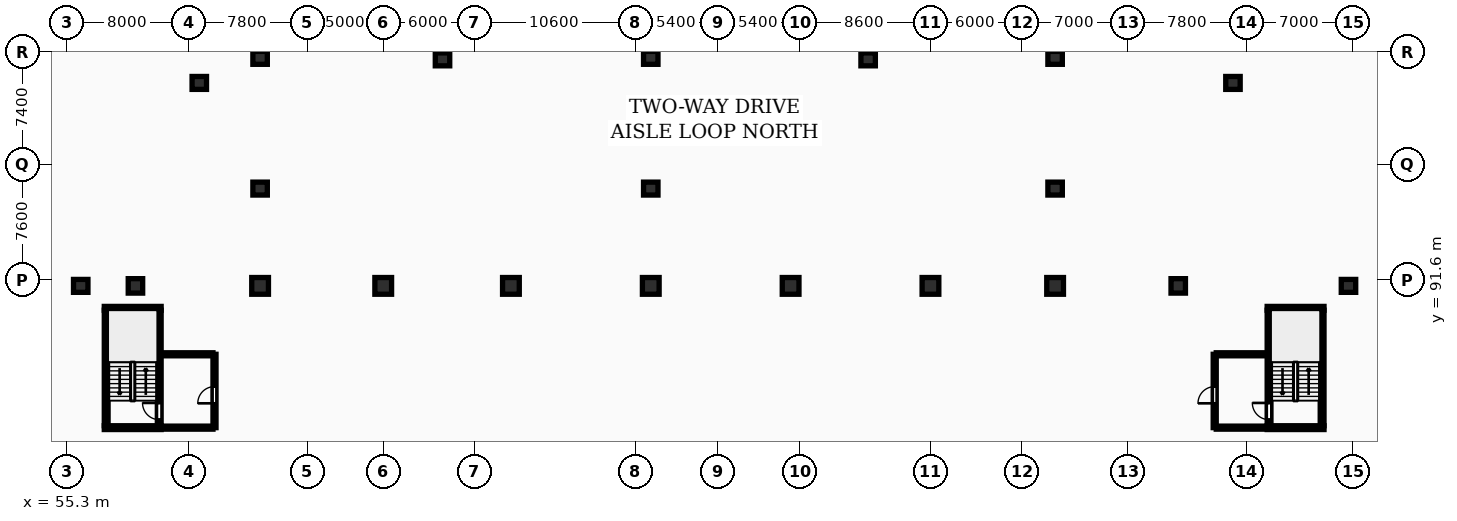
"""IFC4 building model, lengths in metres.
Left out: names, types, materials, properties, quantities, classifications, styles, units other than length and angle.
Written with IfcOpenShell. Run it as: python <this file> out.ifc"""

import sys

from ifc_helpers import new_model, si_unit, direction, frame, frame_2d, origin, origin_2d, place, context, subcontext, project, spatial, rectangle, circle, extrude, element, fill, save


model = new_model("IFC4")
c1 = context("Model", 3, precision=1e-05, world=origin(), true_north=direction((0.0, 1.0)))
c2 = subcontext(c1, "Body", "Model", "MODEL_VIEW")
j1 = project(units=[si_unit("LENGTHUNIT", "METRE"), si_unit("PLANEANGLEUNIT", "RADIAN")], contexts=[c1])
p1 = place(None, origin())
s1 = spatial("IfcSite", under=j1, at=p1, CompositionType="ELEMENT")
p2 = place(p1, origin())
s2 = spatial("IfcBuilding", under=s1, at=p2, CompositionType="ELEMENT")
p3 = place(p2, frame((0.0, 0.0, -7.2)))
s3 = spatial("IfcBuildingStorey", under=s2, at=p3, CompositionType="ELEMENT", Elevation=-7.2)
p4 = place(p3, frame((59.8, 91.2, 0.0), z_axis=(0.0, 0.0, 1.0), x_axis=(1.0, 0.0, 0.0)))
e1 = element("IfcColumn", 1, at=p4, inside=s3, PredefinedType="COLUMN", context=c2, shape_type="SweptSolid", body=[
    extrude(circle(Radius=0.475, at=origin_2d()), origin(), (0.0, 0.0, 1.0), 3.6),
])
for number, where, z_axis, x_axis in (
    (2, (68.0, 91.2, 0.0), (0.0, 0.0, 1.0), (1.0, 0.0, 0.0)),
    (3, (76.1, 91.2, 0.0), (0.0, 0.0, 1.0), (1.0, 0.0, 0.0)),
    (4, (84.5, 91.2, 0.0), (0.0, 0.0, 1.0), (1.0, 0.0, 0.0)),
    (5, (93.7, 91.2, 0.0), (0.0, 0.0, 1.0), (1.0, 0.0, 0.0)),
    (6, (102.9, 91.2, 0.0), (0.0, 0.0, 1.0), (1.0, 0.0, 0.0)),
    (7, (112.1, 91.2, 0.0), (0.0, 0.0, 1.0), (1.0, 0.0, 0.0)),
    (8, (120.3, 91.2, 0.0), (0.0, 0.0, 1.0), (1.0, 0.0, 0.0)),
):
    element("IfcColumn", number, at=place(p3, frame(where, z_axis=z_axis, x_axis=x_axis)), inside=s3, PredefinedType="COLUMN", context=c2, shape_type="SweptSolid", body=[
        extrude(rectangle(XDim=1.1, YDim=1.1, at=origin_2d()), origin(), (0.0, 0.0, 1.0), 3.6),
    ])
p5 = place(p3, frame((128.4, 91.2, 0.0), z_axis=(0.0, 0.0, 1.0), x_axis=(1.0, 0.0, 0.0)))
e9 = element("IfcColumn", 9, at=p5, inside=s3, PredefinedType="COLUMN", context=c2, shape_type="SweptSolid", body=[
    extrude(circle(Radius=0.475, at=origin_2d()), origin(), (0.0, 0.0, 1.0), 3.6),
])
for number, where, z_axis, x_axis in (
    (10, (56.2, 91.2, 0.0), (0.0, 0.0, 1.0), (1.0, 0.0, 0.0)),
    (11, (139.6, 91.2, 0.0), (0.0, 0.0, 1.0), (1.0, 0.0, 0.0)),
    (12, (68.0, 97.6, 0.0), (0.0, 0.0, 1.0), (1.0, 0.0, 0.0)),
    (13, (93.7, 97.6, 0.0), (0.0, 0.0, 1.0), (1.0, 0.0, 0.0)),
    (14, (120.3, 97.6, 0.0), (0.0, 0.0, 1.0), (1.0, 0.0, 0.0)),
    (15, (80.0, 106.1, 0.0), (0.0, 0.0, 1.0), (1.0, 0.0, 0.0)),
    (16, (108.0, 106.1, 0.0), (0.0, 0.0, 1.0), (1.0, 0.0, 0.0)),
    (17, (64.0, 104.55, 0.0), (0.0, 0.0, 1.0), (1.0, 0.0, 0.0)),
    (18, (132.0, 104.55, 0.0), (0.0, 0.0, 1.0), (1.0, 0.0, 0.0)),
    (19, (68.0, 106.2, 0.0), (0.0, 0.0, 1.0), (1.0, 0.0, 0.0)),
    (20, (93.7, 106.2, 0.0), (0.0, 0.0, 1.0), (1.0, 0.0, 0.0)),
    (21, (120.3, 106.2, 0.0), (0.0, 0.0, 1.0), (1.0, 0.0, 0.0)),
):
    element("IfcColumn", number, at=place(p3, frame(where, z_axis=z_axis, x_axis=x_axis)), inside=s3, PredefinedType="COLUMN", context=c2, shape_type="SweptSolid", body=[
        extrude(rectangle(XDim=0.95, YDim=0.85, at=origin_2d()), origin(), (0.0, 0.0, 1.0), 3.6),
    ])
p6 = place(p3, frame((134.375, 82.0, 0.0), z_axis=(0.0, 0.0, 1.0), x_axis=(0.0, 1.0, 0.0)))
e22 = element("IfcWall", 22, at=p6, inside=s3, PredefinedType="SHEAR", context=c2, shape_type="SweptSolid", body=[
    extrude(rectangle(XDim=7.6, YDim=0.25, at=frame_2d((3.8, 0.0))), origin(), (0.0, 0.0, 1.0), 3.6),
])
p7 = place(p6, frame((0.4, 0.0, 0.0)))
e23 = element("IfcOpeningElement", 23, at=p7, cuts=e22, PredefinedType="OPENING", context=c2, shape_type="SweptSolid", body=[
    extrude(rectangle(XDim=1.1, YDim=2.1, at=frame_2d((0.55, 1.05))), frame((0.0, 0.135, 0.0), z_axis=(0.0, -1.0, 0.0), x_axis=(1.0, 0.0, 0.0)), (0.0, 0.0, 1.0), 0.27),
])
p8 = place(p3, frame((137.865, 82.0, 0.0), z_axis=(0.0, 0.0, 1.0), x_axis=(0.0, 1.0, 0.0)))
e24 = element("IfcWall", 24, at=p8, inside=s3, PredefinedType="SHEAR", context=c2, shape_type="SweptSolid", body=[
    extrude(rectangle(XDim=7.6, YDim=0.25, at=frame_2d((3.8, 0.0))), origin(), (0.0, 0.0, 1.0), 3.6),
])
for number, where, z_axis, x_axis in (
    (25, (134.25, 81.875, 0.0), (0.0, 0.0, 1.0), (1.0, 0.0, 0.0)),
    (26, (134.25, 89.725, 0.0), (0.0, 0.0, 1.0), (1.0, 0.0, 0.0)),
):
    element("IfcWall", number, at=place(p3, frame(where, z_axis=z_axis, x_axis=x_axis)), inside=s3, PredefinedType="SHEAR", context=c2, shape_type="SweptSolid", body=[
        extrude(rectangle(XDim=3.74, YDim=0.25, at=frame_2d((1.87, 0.0))), origin(), (0.0, 0.0, 1.0), 3.6),
    ])
p9 = place(p3, frame((130.8, 81.875, 0.0), z_axis=(0.0, 0.0, 1.0), x_axis=(0.0, 1.0, 0.0)))
e27 = element("IfcWall", 27, at=p9, inside=s3, PredefinedType="PARTITIONING", context=c2, shape_type="SweptSolid", body=[
    extrude(rectangle(XDim=4.825, YDim=0.2, at=frame_2d((2.413, 0.0))), origin(), (0.0, 0.0, 1.0), 3.3),
])
p10 = place(p9, frame((1.6, 0.0, 0.0)))
e28 = element("IfcOpeningElement", 28, at=p10, cuts=e27, PredefinedType="OPENING", context=c2, shape_type="SweptSolid", body=[
    extrude(rectangle(XDim=1.1, YDim=2.15, at=frame_2d((0.55, 1.075))), frame((0.0, 0.11, 0.0), z_axis=(0.0, -1.0, 0.0), x_axis=(1.0, 0.0, 0.0)), (0.0, 0.0, 1.0), 0.22),
])
for number, where, z_axis, x_axis in (
    (29, (130.9, 81.875, 0.0), (0.0, 0.0, 1.0), (1.0, 0.0, 0.0)),
    (30, (130.9, 86.7, 0.0), (0.0, 0.0, 1.0), (1.0, 0.0, 0.0)),
):
    element("IfcWall", number, at=place(p3, frame(where, z_axis=z_axis, x_axis=x_axis)), inside=s3, PredefinedType="PARTITIONING", context=c2, shape_type="SweptSolid", body=[
        extrude(rectangle(XDim=3.35, YDim=0.2, at=frame_2d((1.675, 0.0))), origin(), (0.0, 0.0, 1.0), 3.3),
    ])
p11 = place(p3, frame((57.875, 82.0, 0.0), z_axis=(0.0, 0.0, 1.0), x_axis=(0.0, 1.0, 0.0)))
e31 = element("IfcWall", 31, at=p11, inside=s3, PredefinedType="SHEAR", context=c2, shape_type="SweptSolid", body=[
    extrude(rectangle(XDim=7.6, YDim=0.25, at=frame_2d((3.8, 0.0))), origin(), (0.0, 0.0, 1.0), 3.6),
])
for number, where, z_axis, x_axis in (
    (32, (57.75, 81.875, 0.0), (0.0, 0.0, 1.0), (1.0, 0.0, 0.0)),
    (33, (57.75, 89.725, 0.0), (0.0, 0.0, 1.0), (1.0, 0.0, 0.0)),
):
    element("IfcWall", number, at=place(p3, frame(where, z_axis=z_axis, x_axis=x_axis)), inside=s3, PredefinedType="SHEAR", context=c2, shape_type="SweptSolid", body=[
        extrude(rectangle(XDim=3.74, YDim=0.25, at=frame_2d((1.87, 0.0))), origin(), (0.0, 0.0, 1.0), 3.6),
    ])
p12 = place(p3, frame((61.365, 82.0, 0.0), z_axis=(0.0, 0.0, 1.0), x_axis=(0.0, 1.0, 0.0)))
e34 = element("IfcWall", 34, at=p12, inside=s3, PredefinedType="SHEAR", context=c2, shape_type="SweptSolid", body=[
    extrude(rectangle(XDim=7.6, YDim=0.25, at=frame_2d((3.8, 0.0))), origin(), (0.0, 0.0, 1.0), 3.6),
])
p13 = place(p12, frame((0.4, 0.0, 0.0)))
e35 = element("IfcOpeningElement", 35, at=p13, cuts=e34, PredefinedType="OPENING", context=c2, shape_type="SweptSolid", body=[
    extrude(rectangle(XDim=1.1, YDim=2.1, at=frame_2d((0.55, 1.05))), frame((0.0, 0.135, 0.0), z_axis=(0.0, -1.0, 0.0), x_axis=(1.0, 0.0, 0.0)), (0.0, 0.0, 1.0), 0.27),
])
p14 = place(p3, frame((65.0, 81.875, 0.0), z_axis=(0.0, 0.0, 1.0), x_axis=(0.0, 1.0, 0.0)))
e36 = element("IfcWall", 36, at=p14, inside=s3, PredefinedType="PARTITIONING", context=c2, shape_type="SweptSolid", body=[
    extrude(rectangle(XDim=4.825, YDim=0.2, at=frame_2d((2.413, 0.0))), origin(), (0.0, 0.0, 1.0), 3.3),
])
p15 = place(p14, frame((1.6, 0.0, 0.0)))
e37 = element("IfcOpeningElement", 37, at=p15, cuts=e36, PredefinedType="OPENING", context=c2, shape_type="SweptSolid", body=[
    extrude(rectangle(XDim=1.1, YDim=2.15, at=frame_2d((0.55, 1.075))), frame((0.0, 0.11, 0.0), z_axis=(0.0, -1.0, 0.0), x_axis=(1.0, 0.0, 0.0)), (0.0, 0.0, 1.0), 0.22),
])
for number, where, z_axis, x_axis in (
    (38, (61.5, 81.875, 0.0), (0.0, 0.0, 1.0), (1.0, 0.0, 0.0)),
    (39, (61.5, 86.7, 0.0), (0.0, 0.0, 1.0), (1.0, 0.0, 0.0)),
):
    element("IfcWall", number, at=place(p3, frame(where, z_axis=z_axis, x_axis=x_axis)), inside=s3, PredefinedType="PARTITIONING", context=c2, shape_type="SweptSolid", body=[
        extrude(rectangle(XDim=3.4, YDim=0.2, at=frame_2d((1.7, 0.0))), origin(), (0.0, 0.0, 1.0), 3.3),
    ])
p16 = place(p7, origin())
e40 = element("IfcDoor", 40, at=p16, inside=s3, OperationType="SINGLE_SWING_RIGHT", PredefinedType="DOOR", context=c2, shape_type="SweptSolid", body=[
    extrude(rectangle(XDim=1.1, YDim=2.1, at=frame_2d((0.55, 1.05))), frame((0.0, 0.025, 0.0), z_axis=(0.0, -1.0, 0.0), x_axis=(1.0, 0.0, 0.0)), (0.0, 0.0, 1.0), 0.05),
])
fill(e23, e40)
p17 = place(p10, origin())
e41 = element("IfcDoor", 41, at=p17, inside=s3, OperationType="SINGLE_SWING_LEFT", PredefinedType="DOOR", context=c2, shape_type="SweptSolid", body=[
    extrude(rectangle(XDim=1.1, YDim=2.15, at=frame_2d((0.55, 1.075))), frame((0.0, 0.025, 0.0), z_axis=(0.0, -1.0, 0.0), x_axis=(1.0, 0.0, 0.0)), (0.0, 0.0, 1.0), 0.05),
])
fill(e28, e41)
p18 = place(p13, origin())
e42 = element("IfcDoor", 42, at=p18, inside=s3, OperationType="SINGLE_SWING_RIGHT", PredefinedType="DOOR", context=c2, shape_type="SweptSolid", body=[
    extrude(rectangle(XDim=1.1, YDim=2.1, at=frame_2d((0.55, 1.05))), frame((0.0, 0.025, 0.0), z_axis=(0.0, -1.0, 0.0), x_axis=(1.0, 0.0, 0.0)), (0.0, 0.0, 1.0), 0.05),
])
fill(e35, e42)
p19 = place(p15, origin())
e43 = element("IfcDoor", 43, at=p19, inside=s3, OperationType="SINGLE_SWING_LEFT", PredefinedType="DOOR", context=c2, shape_type="SweptSolid", body=[
    extrude(rectangle(XDim=1.1, YDim=2.15, at=frame_2d((0.55, 1.075))), frame((0.0, 0.025, 0.0), z_axis=(0.0, -1.0, 0.0), x_axis=(1.0, 0.0, 0.0)), (0.0, 0.0, 1.0), 0.05),
])
fill(e37, e43)
save(model, sys.argv[1])
